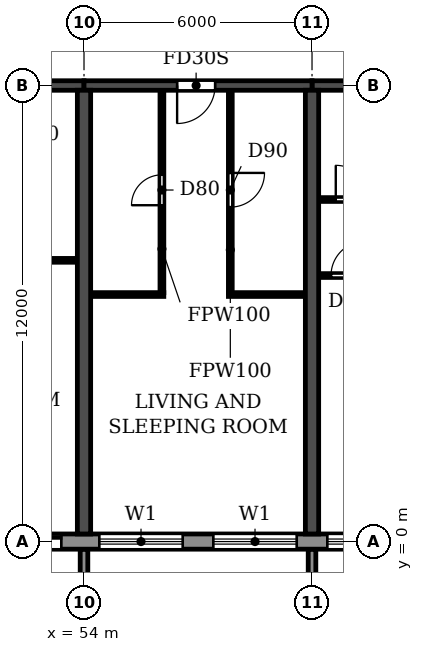
"""IFC4 building model, lengths in metres.
Left out: names, types, materials, properties, quantities, classifications, styles, units other than length and angle.
Written with IfcOpenShell. Run it as: python <this file> out.ifc"""

import sys

from ifc_helpers import new_model, si_unit, direction, frame, frame_2d, origin, place, context, subcontext, project, spatial, polyline, rectangle, outline, extrude, source, transform, mapped, element, fill, save


model = new_model("IFC4")
c1 = context("Model", 3, precision=1e-05, world=origin(), true_north=direction((0.0, 1.0)))
c2 = subcontext(c1, "Body", "Model", "MODEL_VIEW")
j1 = project(units=[si_unit("LENGTHUNIT", "METRE"), si_unit("PLANEANGLEUNIT", "RADIAN")], contexts=[c1])
p1 = place(None, origin())
s1 = spatial("IfcSite", under=j1, at=p1, CompositionType="ELEMENT")
p2 = place(p1, origin())
s2 = spatial("IfcBuilding", under=s1, at=p2, CompositionType="ELEMENT")
p3 = place(p2, frame((0.0, 0.0, 82.8)))
s3 = spatial("IfcBuildingStorey", under=s2, at=p3, CompositionType="ELEMENT", Elevation=82.8)
for number, where, z_axis, x_axis in (
    (1, (54.0, 0.2, 0.0), (0.0, 0.0, 1.0), (0.0, 1.0, 0.0)),
    (2, (60.0, 0.2, 0.0), (0.0, 0.0, 1.0), (0.0, 1.0, 0.0)),
):
    element("IfcWall", number, at=place(p3, frame(where, z_axis=z_axis, x_axis=x_axis)), inside=s3, PredefinedType="SHEAR", context=c2, shape_type="SweptSolid", body=[
        extrude(rectangle(XDim=11.675, YDim=0.35, at=frame_2d((5.837, 0.0))), origin(), (0.0, 0.0, 1.0), 3.06),
    ])
p4 = place(p3, frame((48.0, 12.0, 0.0), z_axis=(0.0, 0.0, 1.0), x_axis=(1.0, 0.0, 0.0)))
e3 = element("IfcWall", 3, at=p4, inside=s3, PredefinedType="SHEAR", context=c2, shape_type="SweptSolid", body=[
    extrude(rectangle(XDim=6.0, YDim=0.25, at=frame_2d((3.0, 0.0))), origin(), (0.0, 0.0, 1.0), 2.46),
])
p5 = place(p4, frame((2.45, 0.0, 0.0)))
e4 = element("IfcOpeningElement", 4, at=p5, cuts=e3, PredefinedType="OPENING", context=c2, shape_type="SweptSolid", body=[
    extrude(rectangle(XDim=1.0, YDim=2.1, at=frame_2d((0.5, 1.05))), frame((0.0, 0.135, 0.0), z_axis=(0.0, -1.0, 0.0), x_axis=(1.0, 0.0, 0.0)), (0.0, 0.0, 1.0), 0.27),
])
p6 = place(p3, frame((54.0, 12.0, 0.0), z_axis=(0.0, 0.0, 1.0), x_axis=(1.0, 0.0, 0.0)))
e5 = element("IfcWall", 5, at=p6, inside=s3, PredefinedType="SHEAR", context=c2, shape_type="SweptSolid", body=[
    extrude(rectangle(XDim=6.0, YDim=0.25, at=frame_2d((3.0, 0.0))), origin(), (0.0, 0.0, 1.0), 2.46),
])
p7 = place(p6, frame((2.45, 0.0, 0.0)))
e6 = element("IfcOpeningElement", 6, at=p7, cuts=e5, PredefinedType="OPENING", context=c2, shape_type="SweptSolid", body=[
    extrude(rectangle(XDim=1.0, YDim=2.1, at=frame_2d((0.5, 1.05))), frame((0.0, 0.135, 0.0), z_axis=(0.0, -1.0, 0.0), x_axis=(1.0, 0.0, 0.0)), (0.0, 0.0, 1.0), 0.27),
])
p8 = place(p3, frame((60.0, 12.0, 0.0), z_axis=(0.0, 0.0, 1.0), x_axis=(1.0, 0.0, 0.0)))
e7 = element("IfcWall", 7, at=p8, inside=s3, PredefinedType="SHEAR", context=c2, shape_type="SweptSolid", body=[
    extrude(rectangle(XDim=6.0, YDim=0.25, at=frame_2d((3.0, 0.0))), origin(), (0.0, 0.0, 1.0), 2.46),
])
p9 = place(p8, frame((2.55, 0.0, 0.0)))
e8 = element("IfcOpeningElement", 8, at=p9, cuts=e7, PredefinedType="OPENING", context=c2, shape_type="SweptSolid", body=[
    extrude(rectangle(XDim=1.0, YDim=2.1, at=frame_2d((0.5, 1.05))), frame((0.0, 0.135, 0.0), z_axis=(0.0, -1.0, 0.0), x_axis=(1.0, 0.0, 0.0)), (0.0, 0.0, 1.0), 0.27),
])
p10 = place(p3, frame((10.683, 0.0, 0.0), z_axis=(0.0, 0.0, 1.0), x_axis=(1.0, 0.0, 0.0)))
e9 = element("IfcWall", 9, at=p10, inside=s3, PredefinedType="STANDARD", context=c2, shape_type="SweptSolid", body=[
    extrude(rectangle(XDim=80.634, YDim=0.4, at=frame_2d((40.317, 0.0))), origin(), (0.0, 0.0, 1.0), 3.06),
])
p11 = place(p10, frame((1.717, 0.0, 0.9)))
e10 = element("IfcOpeningElement", 10, at=p11, cuts=e9, PredefinedType="OPENING", context=c2, shape_type="SweptSolid", body=[
    extrude(rectangle(XDim=2.2, YDim=1.5, at=frame_2d((1.1, 0.75))), frame((0.0, 0.21, 0.0), z_axis=(0.0, -1.0, 0.0), x_axis=(1.0, 0.0, 0.0)), (0.0, 0.0, 1.0), 0.42),
])
p12 = place(p10, frame((4.917, 0.0, 0.0)))
e11 = element("IfcOpeningElement", 11, at=p12, cuts=e9, PredefinedType="OPENING", context=c2, shape_type="SweptSolid", body=[
    extrude(rectangle(XDim=1.8, YDim=2.4, at=frame_2d((0.9, 1.2))), frame((0.0, 0.21, 0.0), z_axis=(0.0, -1.0, 0.0), x_axis=(1.0, 0.0, 0.0)), (0.0, 0.0, 1.0), 0.42),
])
p13 = place(p10, frame((7.717, 0.0, 0.9)))
e12 = element("IfcOpeningElement", 12, at=p13, cuts=e9, PredefinedType="OPENING", context=c2, shape_type="SweptSolid", body=[
    extrude(rectangle(XDim=2.2, YDim=1.5, at=frame_2d((1.1, 0.75))), frame((0.0, 0.21, 0.0), z_axis=(0.0, -1.0, 0.0), x_axis=(1.0, 0.0, 0.0)), (0.0, 0.0, 1.0), 0.42),
])
p14 = place(p10, frame((10.717, 0.0, 0.9)))
e13 = element("IfcOpeningElement", 13, at=p14, cuts=e9, PredefinedType="OPENING", context=c2, shape_type="SweptSolid", body=[
    extrude(rectangle(XDim=2.2, YDim=1.5, at=frame_2d((1.1, 0.75))), frame((0.0, 0.21, 0.0), z_axis=(0.0, -1.0, 0.0), x_axis=(1.0, 0.0, 0.0)), (0.0, 0.0, 1.0), 0.42),
])
p15 = place(p10, frame((13.917, 0.0, 0.0)))
e14 = element("IfcOpeningElement", 14, at=p15, cuts=e9, PredefinedType="OPENING", context=c2, shape_type="SweptSolid", body=[
    extrude(rectangle(XDim=1.8, YDim=2.4, at=frame_2d((0.9, 1.2))), frame((0.0, 0.21, 0.0), z_axis=(0.0, -1.0, 0.0), x_axis=(1.0, 0.0, 0.0)), (0.0, 0.0, 1.0), 0.42),
])
p16 = place(p10, frame((16.717, 0.0, 0.9)))
e15 = element("IfcOpeningElement", 15, at=p16, cuts=e9, PredefinedType="OPENING", context=c2, shape_type="SweptSolid", body=[
    extrude(rectangle(XDim=2.2, YDim=1.5, at=frame_2d((1.1, 0.75))), frame((0.0, 0.21, 0.0), z_axis=(0.0, -1.0, 0.0), x_axis=(1.0, 0.0, 0.0)), (0.0, 0.0, 1.0), 0.42),
])
p17 = place(p10, frame((19.717, 0.0, 0.9)))
e16 = element("IfcOpeningElement", 16, at=p17, cuts=e9, PredefinedType="OPENING", context=c2, shape_type="SweptSolid", body=[
    extrude(rectangle(XDim=2.2, YDim=1.5, at=frame_2d((1.1, 0.75))), frame((0.0, 0.21, 0.0), z_axis=(0.0, -1.0, 0.0), x_axis=(1.0, 0.0, 0.0)), (0.0, 0.0, 1.0), 0.42),
])
p18 = place(p10, frame((22.717, 0.0, 0.9)))
e17 = element("IfcOpeningElement", 17, at=p18, cuts=e9, PredefinedType="OPENING", context=c2, shape_type="SweptSolid", body=[
    extrude(rectangle(XDim=2.2, YDim=1.5, at=frame_2d((1.1, 0.75))), frame((0.0, 0.21, 0.0), z_axis=(0.0, -1.0, 0.0), x_axis=(1.0, 0.0, 0.0)), (0.0, 0.0, 1.0), 0.42),
])
p19 = place(p10, frame((25.917, 0.0, 0.0)))
e18 = element("IfcOpeningElement", 18, at=p19, cuts=e9, PredefinedType="OPENING", context=c2, shape_type="SweptSolid", body=[
    extrude(rectangle(XDim=1.8, YDim=2.4, at=frame_2d((0.9, 1.2))), frame((0.0, 0.21, 0.0), z_axis=(0.0, -1.0, 0.0), x_axis=(1.0, 0.0, 0.0)), (0.0, 0.0, 1.0), 0.42),
])
p20 = place(p10, frame((28.717, 0.0, 0.9)))
e19 = element("IfcOpeningElement", 19, at=p20, cuts=e9, PredefinedType="OPENING", context=c2, shape_type="SweptSolid", body=[
    extrude(rectangle(XDim=2.2, YDim=1.5, at=frame_2d((1.1, 0.75))), frame((0.0, 0.21, 0.0), z_axis=(0.0, -1.0, 0.0), x_axis=(1.0, 0.0, 0.0)), (0.0, 0.0, 1.0), 0.42),
])
p21 = place(p10, frame((31.717, 0.0, 0.9)))
e20 = element("IfcOpeningElement", 20, at=p21, cuts=e9, PredefinedType="OPENING", context=c2, shape_type="SweptSolid", body=[
    extrude(rectangle(XDim=2.2, YDim=1.5, at=frame_2d((1.1, 0.75))), frame((0.0, 0.21, 0.0), z_axis=(0.0, -1.0, 0.0), x_axis=(1.0, 0.0, 0.0)), (0.0, 0.0, 1.0), 0.42),
])
p22 = place(p10, frame((34.717, 0.0, 0.9)))
e21 = element("IfcOpeningElement", 21, at=p22, cuts=e9, PredefinedType="OPENING", context=c2, shape_type="SweptSolid", body=[
    extrude(rectangle(XDim=2.2, YDim=1.5, at=frame_2d((1.1, 0.75))), frame((0.0, 0.21, 0.0), z_axis=(0.0, -1.0, 0.0), x_axis=(1.0, 0.0, 0.0)), (0.0, 0.0, 1.0), 0.42),
])
p23 = place(p10, frame((37.717, 0.0, 0.9)))
e22 = element("IfcOpeningElement", 22, at=p23, cuts=e9, PredefinedType="OPENING", context=c2, shape_type="SweptSolid", body=[
    extrude(rectangle(XDim=2.2, YDim=1.5, at=frame_2d((1.1, 0.75))), frame((0.0, 0.21, 0.0), z_axis=(0.0, -1.0, 0.0), x_axis=(1.0, 0.0, 0.0)), (0.0, 0.0, 1.0), 0.42),
])
p24 = place(p10, frame((40.917, 0.0, 0.0)))
e23 = element("IfcOpeningElement", 23, at=p24, cuts=e9, PredefinedType="OPENING", context=c2, shape_type="SweptSolid", body=[
    extrude(rectangle(XDim=1.8, YDim=2.4, at=frame_2d((0.9, 1.2))), frame((0.0, 0.21, 0.0), z_axis=(0.0, -1.0, 0.0), x_axis=(1.0, 0.0, 0.0)), (0.0, 0.0, 1.0), 0.42),
])
p25 = place(p10, frame((43.717, 0.0, 0.9)))
e24 = element("IfcOpeningElement", 24, at=p25, cuts=e9, PredefinedType="OPENING", context=c2, shape_type="SweptSolid", body=[
    extrude(rectangle(XDim=2.2, YDim=1.5, at=frame_2d((1.1, 0.75))), frame((0.0, 0.21, 0.0), z_axis=(0.0, -1.0, 0.0), x_axis=(1.0, 0.0, 0.0)), (0.0, 0.0, 1.0), 0.42),
])
p26 = place(p10, frame((46.717, 0.0, 0.9)))
e25 = element("IfcOpeningElement", 25, at=p26, cuts=e9, PredefinedType="OPENING", context=c2, shape_type="SweptSolid", body=[
    extrude(rectangle(XDim=2.2, YDim=1.5, at=frame_2d((1.1, 0.75))), frame((0.0, 0.21, 0.0), z_axis=(0.0, -1.0, 0.0), x_axis=(1.0, 0.0, 0.0)), (0.0, 0.0, 1.0), 0.42),
])
p27 = place(p10, frame((49.717, 0.0, 0.9)))
e26 = element("IfcOpeningElement", 26, at=p27, cuts=e9, PredefinedType="OPENING", context=c2, shape_type="SweptSolid", body=[
    extrude(rectangle(XDim=2.2, YDim=1.5, at=frame_2d((1.1, 0.75))), frame((0.0, 0.21, 0.0), z_axis=(0.0, -1.0, 0.0), x_axis=(1.0, 0.0, 0.0)), (0.0, 0.0, 1.0), 0.42),
])
p28 = place(p10, frame((52.917, 0.0, 0.0)))
e27 = element("IfcOpeningElement", 27, at=p28, cuts=e9, PredefinedType="OPENING", context=c2, shape_type="SweptSolid", body=[
    extrude(rectangle(XDim=1.8, YDim=2.4, at=frame_2d((0.9, 1.2))), frame((0.0, 0.21, 0.0), z_axis=(0.0, -1.0, 0.0), x_axis=(1.0, 0.0, 0.0)), (0.0, 0.0, 1.0), 0.42),
])
p29 = place(p10, frame((55.717, 0.0, 0.9)))
e28 = element("IfcOpeningElement", 28, at=p29, cuts=e9, PredefinedType="OPENING", context=c2, shape_type="SweptSolid", body=[
    extrude(rectangle(XDim=2.2, YDim=1.5, at=frame_2d((1.1, 0.75))), frame((0.0, 0.21, 0.0), z_axis=(0.0, -1.0, 0.0), x_axis=(1.0, 0.0, 0.0)), (0.0, 0.0, 1.0), 0.42),
])
p30 = place(p10, frame((58.717, 0.0, 0.9)))
e29 = element("IfcOpeningElement", 29, at=p30, cuts=e9, PredefinedType="OPENING", context=c2, shape_type="SweptSolid", body=[
    extrude(rectangle(XDim=2.2, YDim=1.5, at=frame_2d((1.1, 0.75))), frame((0.0, 0.21, 0.0), z_axis=(0.0, -1.0, 0.0), x_axis=(1.0, 0.0, 0.0)), (0.0, 0.0, 1.0), 0.42),
])
p31 = place(p10, frame((61.717, 0.0, 0.9)))
e30 = element("IfcOpeningElement", 30, at=p31, cuts=e9, PredefinedType="OPENING", context=c2, shape_type="SweptSolid", body=[
    extrude(rectangle(XDim=2.2, YDim=1.5, at=frame_2d((1.1, 0.75))), frame((0.0, 0.21, 0.0), z_axis=(0.0, -1.0, 0.0), x_axis=(1.0, 0.0, 0.0)), (0.0, 0.0, 1.0), 0.42),
])
p32 = place(p10, frame((64.917, 0.0, 0.0)))
e31 = element("IfcOpeningElement", 31, at=p32, cuts=e9, PredefinedType="OPENING", context=c2, shape_type="SweptSolid", body=[
    extrude(rectangle(XDim=1.8, YDim=2.4, at=frame_2d((0.9, 1.2))), frame((0.0, 0.21, 0.0), z_axis=(0.0, -1.0, 0.0), x_axis=(1.0, 0.0, 0.0)), (0.0, 0.0, 1.0), 0.42),
])
p33 = place(p10, frame((67.717, 0.0, 0.9)))
e32 = element("IfcOpeningElement", 32, at=p33, cuts=e9, PredefinedType="OPENING", context=c2, shape_type="SweptSolid", body=[
    extrude(rectangle(XDim=2.2, YDim=1.5, at=frame_2d((1.1, 0.75))), frame((0.0, 0.21, 0.0), z_axis=(0.0, -1.0, 0.0), x_axis=(1.0, 0.0, 0.0)), (0.0, 0.0, 1.0), 0.42),
])
p34 = place(p10, frame((70.717, 0.0, 0.9)))
e33 = element("IfcOpeningElement", 33, at=p34, cuts=e9, PredefinedType="OPENING", context=c2, shape_type="SweptSolid", body=[
    extrude(rectangle(XDim=2.2, YDim=1.5, at=frame_2d((1.1, 0.75))), frame((0.0, 0.21, 0.0), z_axis=(0.0, -1.0, 0.0), x_axis=(1.0, 0.0, 0.0)), (0.0, 0.0, 1.0), 0.42),
])
p35 = place(p10, frame((73.917, 0.0, 0.0)))
e34 = element("IfcOpeningElement", 34, at=p35, cuts=e9, PredefinedType="OPENING", context=c2, shape_type="SweptSolid", body=[
    extrude(rectangle(XDim=1.8, YDim=2.4, at=frame_2d((0.9, 1.2))), frame((0.0, 0.21, 0.0), z_axis=(0.0, -1.0, 0.0), x_axis=(1.0, 0.0, 0.0)), (0.0, 0.0, 1.0), 0.42),
])
p36 = place(p10, frame((76.717, 0.0, 0.9)))
e35 = element("IfcOpeningElement", 35, at=p36, cuts=e9, PredefinedType="OPENING", context=c2, shape_type="SweptSolid", body=[
    extrude(rectangle(XDim=2.2, YDim=1.5, at=frame_2d((1.1, 0.75))), frame((0.0, 0.21, 0.0), z_axis=(0.0, -1.0, 0.0), x_axis=(1.0, 0.0, 0.0)), (0.0, 0.0, 1.0), 0.42),
])
m1 = source(origin(), c2, "Body", "SweptSolid", [
    extrude(outline(polyline([(0.0, 0.0), (0.2, 0.0), (0.2, 1.65), (0.0, 1.65), (0.0, 0.0)])), origin(), (0.0, 0.0, 1.0), 3.1),
])
for number, where in (
    (36, (53.9, -1.85, 0.0)),
    (37, (59.9, -1.85, 0.0)),
):
    element("IfcWall", number, at=place(p3, frame(where)), inside=s3, PredefinedType="STANDARD", context=c2, shape_type="MappedRepresentation", body=[
        mapped(m1, transform((0.0, 0.0, 0.0))),
    ])
p37 = place(p3, frame((54.185, 6.5, 0.0), z_axis=(0.0, 0.0, 1.0), x_axis=(1.0, 0.0, 0.0)))
e38 = element("IfcWall", 38, at=p37, inside=s3, PredefinedType="PARTITIONING", context=c2, shape_type="SweptSolid", body=[
    extrude(rectangle(XDim=1.915, YDim=0.1, at=frame_2d((0.958, 0.0))), origin(), (0.0, 0.0, 1.0), 3.06),
])
p38 = place(p3, frame((57.8, 6.5, 0.0), z_axis=(0.0, 0.0, 1.0), x_axis=(1.0, 0.0, 0.0)))
e39 = element("IfcWall", 39, at=p38, inside=s3, PredefinedType="PARTITIONING", context=c2, shape_type="SweptSolid", body=[
    extrude(rectangle(XDim=2.015, YDim=0.1, at=frame_2d((1.007, 0.0))), origin(), (0.0, 0.0, 1.0), 3.06),
])
p39 = place(p3, frame((60.185, 7.0, 0.0), z_axis=(0.0, 0.0, 1.0), x_axis=(1.0, 0.0, 0.0)))
e40 = element("IfcWall", 40, at=p39, inside=s3, PredefinedType="PARTITIONING", context=c2, shape_type="SweptSolid", body=[
    extrude(rectangle(XDim=2.865, YDim=0.1, at=frame_2d((1.433, 0.0))), origin(), (0.0, 0.0, 1.0), 3.06),
])
p40 = place(p39, frame((0.315, 0.0, 0.0)))
e41 = element("IfcOpeningElement", 41, at=p40, cuts=e40, PredefinedType="OPENING", context=c2, shape_type="SweptSolid", body=[
    extrude(rectangle(XDim=0.9, YDim=2.1, at=frame_2d((0.45, 1.05))), frame((0.0, 0.06, 0.0), z_axis=(0.0, -1.0, 0.0), x_axis=(1.0, 0.0, 0.0)), (0.0, 0.0, 1.0), 0.12),
])
p41 = place(p3, frame((51.8, 7.4, 0.0), z_axis=(0.0, 0.0, 1.0), x_axis=(1.0, 0.0, 0.0)))
e42 = element("IfcWall", 42, at=p41, inside=s3, PredefinedType="PARTITIONING", context=c2, shape_type="SweptSolid", body=[
    extrude(rectangle(XDim=2.015, YDim=0.1, at=frame_2d((1.007, 0.0))), origin(), (0.0, 0.0, 1.0), 3.06),
])
p42 = place(p3, frame((60.185, 9.0, 0.0), z_axis=(0.0, 0.0, 1.0), x_axis=(1.0, 0.0, 0.0)))
e43 = element("IfcWall", 43, at=p42, inside=s3, PredefinedType="PARTITIONING", context=c2, shape_type="SweptSolid", body=[
    extrude(rectangle(XDim=2.015, YDim=0.1, at=frame_2d((1.007, 0.0))), origin(), (0.0, 0.0, 1.0), 3.06),
])
p43 = place(p42, frame((0.44, 0.0, 0.0)))
e44 = element("IfcOpeningElement", 44, at=p43, cuts=e43, PredefinedType="OPENING", context=c2, shape_type="SweptSolid", body=[
    extrude(rectangle(XDim=0.9, YDim=2.1, at=frame_2d((0.45, 1.05))), frame((0.0, 0.06, 0.0), z_axis=(0.0, -1.0, 0.0), x_axis=(1.0, 0.0, 0.0)), (0.0, 0.0, 1.0), 0.12),
])
p44 = place(p3, frame((56.05, 6.55, 0.0), z_axis=(0.0, 0.0, 1.0), x_axis=(0.0, 1.0, 0.0)))
e45 = element("IfcWall", 45, at=p44, inside=s3, PredefinedType="PARTITIONING", context=c2, shape_type="SweptSolid", body=[
    extrude(rectangle(XDim=5.315, YDim=0.1, at=frame_2d((2.657, 0.0))), origin(), (0.0, 0.0, 1.0), 3.06),
])
p45 = place(p44, frame((2.3, 0.0, 0.0)))
e46 = element("IfcOpeningElement", 46, at=p45, cuts=e45, PredefinedType="OPENING", context=c2, shape_type="SweptSolid", body=[
    extrude(rectangle(XDim=0.8, YDim=2.1, at=frame_2d((0.4, 1.05))), frame((0.0, 0.06, 0.0), z_axis=(0.0, -1.0, 0.0), x_axis=(1.0, 0.0, 0.0)), (0.0, 0.0, 1.0), 0.12),
])
p46 = place(p3, frame((57.85, 6.55, 0.0), z_axis=(0.0, 0.0, 1.0), x_axis=(0.0, 1.0, 0.0)))
e47 = element("IfcWall", 47, at=p46, inside=s3, PredefinedType="PARTITIONING", context=c2, shape_type="SweptSolid", body=[
    extrude(rectangle(XDim=5.315, YDim=0.1, at=frame_2d((2.657, 0.0))), origin(), (0.0, 0.0, 1.0), 3.06),
])
p47 = place(p46, frame((2.25, 0.0, 0.0)))
e48 = element("IfcOpeningElement", 48, at=p47, cuts=e47, PredefinedType="OPENING", context=c2, shape_type="SweptSolid", body=[
    extrude(rectangle(XDim=0.9, YDim=2.1, at=frame_2d((0.45, 1.05))), frame((0.0, 0.06, 0.0), z_axis=(0.0, -1.0, 0.0), x_axis=(1.0, 0.0, 0.0)), (0.0, 0.0, 1.0), 0.12),
])
p48 = place(p24, origin())
e49 = element("IfcDoor", 49, at=p48, inside=s3, OperationType="DOUBLE_DOOR_SLIDING", PredefinedType="DOOR", context=c2, shape_type="SweptSolid", body=[
    extrude(rectangle(XDim=1.8, YDim=2.4, at=frame_2d((0.9, 1.2))), frame((0.0, 0.025, 0.0), z_axis=(0.0, -1.0, 0.0), x_axis=(1.0, 0.0, 0.0)), (0.0, 0.0, 1.0), 0.05),
])
fill(e23, e49)
p49 = place(p25, origin())
e50 = element("IfcWindow", 50, at=p49, inside=s3, PartitioningType="DOUBLE_PANEL_HORIZONTAL", PredefinedType="WINDOW", context=c2, shape_type="SweptSolid", body=[
    extrude(rectangle(XDim=2.2, YDim=1.5, at=frame_2d((1.1, 0.75))), frame((0.0, 0.03, 0.0), z_axis=(0.0, -1.0, 0.0), x_axis=(1.0, 0.0, 0.0)), (0.0, 0.0, 1.0), 0.06),
])
fill(e24, e50)
p50 = place(p26, origin())
e51 = element("IfcWindow", 51, at=p50, inside=s3, PartitioningType="DOUBLE_PANEL_HORIZONTAL", PredefinedType="WINDOW", context=c2, shape_type="SweptSolid", body=[
    extrude(rectangle(XDim=2.2, YDim=1.5, at=frame_2d((1.1, 0.75))), frame((0.0, 0.03, 0.0), z_axis=(0.0, -1.0, 0.0), x_axis=(1.0, 0.0, 0.0)), (0.0, 0.0, 1.0), 0.06),
])
fill(e25, e51)
p51 = place(p27, origin())
e52 = element("IfcWindow", 52, at=p51, inside=s3, PartitioningType="DOUBLE_PANEL_HORIZONTAL", PredefinedType="WINDOW", context=c2, shape_type="SweptSolid", body=[
    extrude(rectangle(XDim=2.2, YDim=1.5, at=frame_2d((1.1, 0.75))), frame((0.0, 0.03, 0.0), z_axis=(0.0, -1.0, 0.0), x_axis=(1.0, 0.0, 0.0)), (0.0, 0.0, 1.0), 0.06),
])
fill(e26, e52)
p52 = place(p45, origin())
e53 = element("IfcDoor", 53, at=p52, inside=s3, OperationType="SINGLE_SWING_LEFT", PredefinedType="DOOR", context=c2, shape_type="SweptSolid", body=[
    extrude(rectangle(XDim=0.8, YDim=2.1, at=frame_2d((0.4, 1.05))), frame((0.0, 0.025, 0.0), z_axis=(0.0, -1.0, 0.0), x_axis=(1.0, 0.0, 0.0)), (0.0, 0.0, 1.0), 0.05),
])
fill(e46, e53)
p53 = place(p7, frame((1.0, 0.0, 0.0), z_axis=(0.0, 0.0, 1.0), x_axis=(-1.0, 0.0, 0.0)))
e54 = element("IfcDoor", 54, at=p53, inside=s3, OperationType="SINGLE_SWING_RIGHT", PredefinedType="DOOR", context=c2, shape_type="SweptSolid", body=[
    extrude(rectangle(XDim=1.0, YDim=2.1, at=frame_2d((0.5, 1.05))), frame((0.0, 0.025, 0.0), z_axis=(0.0, -1.0, 0.0), x_axis=(1.0, 0.0, 0.0)), (0.0, 0.0, 1.0), 0.05),
])
fill(e6, e54)
p54 = place(p47, frame((0.9, 0.0, 0.0), z_axis=(0.0, 0.0, 1.0), x_axis=(-1.0, 0.0, 0.0)))
e55 = element("IfcDoor", 55, at=p54, inside=s3, OperationType="SINGLE_SWING_LEFT", PredefinedType="DOOR", context=c2, shape_type="SweptSolid", body=[
    extrude(rectangle(XDim=0.9, YDim=2.1, at=frame_2d((0.45, 1.05))), frame((0.0, 0.025, 0.0), z_axis=(0.0, -1.0, 0.0), x_axis=(1.0, 0.0, 0.0)), (0.0, 0.0, 1.0), 0.05),
])
fill(e48, e55)
p55 = place(p40, origin())
e56 = element("IfcDoor", 56, at=p55, inside=s3, OperationType="SINGLE_SWING_RIGHT", PredefinedType="DOOR", context=c2, shape_type="SweptSolid", body=[
    extrude(rectangle(XDim=0.9, YDim=2.1, at=frame_2d((0.45, 1.05))), frame((0.0, 0.025, 0.0), z_axis=(0.0, -1.0, 0.0), x_axis=(1.0, 0.0, 0.0)), (0.0, 0.0, 1.0), 0.05),
])
fill(e41, e56)
p56 = place(p43, origin())
e57 = element("IfcDoor", 57, at=p56, inside=s3, OperationType="SINGLE_SWING_LEFT", PredefinedType="DOOR", context=c2, shape_type="SweptSolid", body=[
    extrude(rectangle(XDim=0.9, YDim=2.1, at=frame_2d((0.45, 1.05))), frame((0.0, 0.025, 0.0), z_axis=(0.0, -1.0, 0.0), x_axis=(1.0, 0.0, 0.0)), (0.0, 0.0, 1.0), 0.05),
])
fill(e44, e57)
save(model, sys.argv[1])
